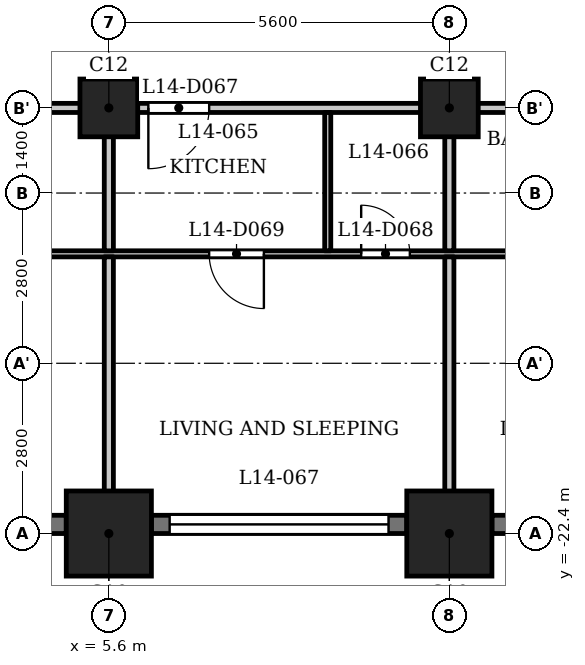
"""IFC4 building model, lengths in metres.
Left out: names, types, materials, properties, quantities, classifications, styles, units other than length and angle.
Written with IfcOpenShell. Run it as: python <this file> out.ifc"""

import sys

from ifc_helpers import new_model, si_unit, direction, frame, frame_2d, origin, origin_2d, place, context, subcontext, project, spatial, rectangle, extrude, element, fill, save


model = new_model("IFC4")
c1 = context("Model", 3, precision=1e-05, world=origin(), true_north=direction((0.0, 1.0)))
c2 = subcontext(c1, "Body", "Model", "MODEL_VIEW")
j1 = project(units=[si_unit("LENGTHUNIT", "METRE"), si_unit("PLANEANGLEUNIT", "RADIAN")], contexts=[c1])
p1 = place(None, origin())
s1 = spatial("IfcSite", under=j1, at=p1, CompositionType="ELEMENT")
p2 = place(p1, origin())
s2 = spatial("IfcBuilding", under=s1, at=p2, CompositionType="ELEMENT")
p3 = place(p2, frame((0.0, 0.0, 58.5)))
s3 = spatial("IfcBuildingStorey", under=s2, at=p3, CompositionType="ELEMENT", Elevation=58.5)
for number, where, z_axis, x_axis in (
    (1, (5.6, -22.4, 0.0), (0.0, 0.0, 1.0), (1.0, 0.0, 0.0)),
    (2, (11.2, -22.4, 0.0), (0.0, 0.0, 1.0), (1.0, 0.0, 0.0)),
):
    element("IfcColumn", number, at=place(p3, frame(where, z_axis=z_axis, x_axis=x_axis)), inside=s3, PredefinedType="COLUMN", context=c2, shape_type="SweptSolid", body=[
        extrude(rectangle(XDim=1.4, YDim=1.4, at=origin_2d()), origin(), (0.0, 0.0, 1.0), 3.5),
    ])
for number, where, z_axis, x_axis in (
    (3, (5.6, -15.4, 0.0), (0.0, 0.0, 1.0), (1.0, 0.0, 0.0)),
    (4, (11.2, -15.4, 0.0), (0.0, 0.0, 1.0), (1.0, 0.0, 0.0)),
):
    element("IfcColumn", number, at=place(p3, frame(where, z_axis=z_axis, x_axis=x_axis)), inside=s3, PredefinedType="COLUMN", context=c2, shape_type="SweptSolid", body=[
        extrude(rectangle(XDim=0.95, YDim=0.95, at=origin_2d()), origin(), (0.0, 0.0, 1.0), 3.5),
    ])
p4 = place(p3, frame((0.7, -22.25, 0.0), z_axis=(0.0, 0.0, 1.0), x_axis=(1.0, 0.0, 0.0)))
e5 = element("IfcWall", 5, at=p4, inside=s3, PredefinedType="SOLIDWALL", context=c2, shape_type="SweptSolid", body=[
    extrude(rectangle(XDim=4.2, YDim=0.3, at=frame_2d((2.1, 0.0))), origin(), (0.0, 0.0, 1.0), 2.35),
])
p5 = place(p4, frame((0.3, 0.0, 1.2)))
e6 = element("IfcOpeningElement", 6, at=p5, cuts=e5, PredefinedType="OPENING", context=c2, shape_type="SweptSolid", body=[
    extrude(rectangle(XDim=3.6, YDim=0.95, at=frame_2d((1.8, 0.475))), frame((0.0, 0.16, 0.0), z_axis=(0.0, -1.0, 0.0), x_axis=(1.0, 0.0, 0.0)), (0.0, 0.0, 1.0), 0.32),
])
p6 = place(p3, frame((6.3, -22.25, 0.0), z_axis=(0.0, 0.0, 1.0), x_axis=(1.0, 0.0, 0.0)))
e7 = element("IfcWall", 7, at=p6, inside=s3, PredefinedType="SOLIDWALL", context=c2, shape_type="SweptSolid", body=[
    extrude(rectangle(XDim=4.2, YDim=0.3, at=frame_2d((2.1, 0.0))), origin(), (0.0, 0.0, 1.0), 2.35),
])
p7 = place(p6, frame((0.3, 0.0, 1.2)))
e8 = element("IfcOpeningElement", 8, at=p7, cuts=e7, PredefinedType="OPENING", context=c2, shape_type="SweptSolid", body=[
    extrude(rectangle(XDim=3.6, YDim=0.95, at=frame_2d((1.8, 0.475))), frame((0.0, 0.16, 0.0), z_axis=(0.0, -1.0, 0.0), x_axis=(1.0, 0.0, 0.0)), (0.0, 0.0, 1.0), 0.32),
])
p8 = place(p3, frame((11.9, -22.25, 0.0), z_axis=(0.0, 0.0, 1.0), x_axis=(1.0, 0.0, 0.0)))
e9 = element("IfcWall", 9, at=p8, inside=s3, PredefinedType="SOLIDWALL", context=c2, shape_type="SweptSolid", body=[
    extrude(rectangle(XDim=4.2, YDim=0.3, at=frame_2d((2.1, 0.0))), origin(), (0.0, 0.0, 1.0), 2.35),
])
p9 = place(p8, frame((0.3, 0.0, 1.2)))
e10 = element("IfcOpeningElement", 10, at=p9, cuts=e9, PredefinedType="OPENING", context=c2, shape_type="SweptSolid", body=[
    extrude(rectangle(XDim=3.6, YDim=0.95, at=frame_2d((1.8, 0.475))), frame((0.0, 0.16, 0.0), z_axis=(0.0, -1.0, 0.0), x_axis=(1.0, 0.0, 0.0)), (0.0, 0.0, 1.0), 0.32),
])
p10 = place(p3, frame((-26.394, -17.8, 0.0), z_axis=(0.0, 0.0, 1.0), x_axis=(1.0, 0.0, 0.0)))
e11 = element("IfcWall", 11, at=p10, inside=s3, PredefinedType="PARTITIONING", context=c2, shape_type="SweptSolid", body=[
    extrude(rectangle(XDim=53.034, YDim=0.1, at=frame_2d((26.517, 0.0))), origin(), (0.0, 0.0, 1.0), 3.2),
])
p11 = place(p10, frame((0.794, 0.0, 0.0)))
e12 = element("IfcOpeningElement", 12, at=p11, cuts=e11, PredefinedType="OPENING", context=c2, shape_type="SweptSolid", body=[
    extrude(rectangle(XDim=0.8, YDim=2.1, at=frame_2d((0.4, 1.05))), frame((0.0, 0.06, 0.0), z_axis=(0.0, -1.0, 0.0), x_axis=(1.0, 0.0, 0.0)), (0.0, 0.0, 1.0), 0.12),
])
p12 = place(p10, frame((5.644, 0.0, 0.0)))
e13 = element("IfcOpeningElement", 13, at=p12, cuts=e11, PredefinedType="OPENING", context=c2, shape_type="SweptSolid", body=[
    extrude(rectangle(XDim=0.9, YDim=2.1, at=frame_2d((0.45, 1.05))), frame((0.0, 0.06, 0.0), z_axis=(0.0, -1.0, 0.0), x_axis=(1.0, 0.0, 0.0)), (0.0, 0.0, 1.0), 0.12),
])
p13 = place(p10, frame((19.344, 0.0, 0.0)))
e14 = element("IfcOpeningElement", 14, at=p13, cuts=e11, PredefinedType="OPENING", context=c2, shape_type="SweptSolid", body=[
    extrude(rectangle(XDim=0.8, YDim=2.1, at=frame_2d((0.4, 1.05))), frame((0.0, 0.06, 0.0), z_axis=(0.0, -1.0, 0.0), x_axis=(1.0, 0.0, 0.0)), (0.0, 0.0, 1.0), 0.12),
])
p14 = place(p10, frame((17.094, 0.0, 0.0)))
e15 = element("IfcOpeningElement", 15, at=p14, cuts=e11, PredefinedType="OPENING", context=c2, shape_type="SweptSolid", body=[
    extrude(rectangle(XDim=0.9, YDim=2.1, at=frame_2d((0.45, 1.05))), frame((0.0, 0.06, 0.0), z_axis=(0.0, -1.0, 0.0), x_axis=(1.0, 0.0, 0.0)), (0.0, 0.0, 1.0), 0.12),
])
p15 = place(p10, frame((10.494, 0.0, 0.0)))
e16 = element("IfcOpeningElement", 16, at=p15, cuts=e11, PredefinedType="OPENING", context=c2, shape_type="SweptSolid", body=[
    extrude(rectangle(XDim=0.9, YDim=2.1, at=frame_2d((0.45, 1.05))), frame((0.0, 0.06, 0.0), z_axis=(0.0, -1.0, 0.0), x_axis=(1.0, 0.0, 0.0)), (0.0, 0.0, 1.0), 0.12),
])
p16 = place(p10, frame((13.294, 0.0, 0.0)))
e17 = element("IfcOpeningElement", 17, at=p16, cuts=e11, PredefinedType="OPENING", context=c2, shape_type="SweptSolid", body=[
    extrude(rectangle(XDim=0.9, YDim=2.1, at=frame_2d((0.45, 1.05))), frame((0.0, 0.06, 0.0), z_axis=(0.0, -1.0, 0.0), x_axis=(1.0, 0.0, 0.0)), (0.0, 0.0, 1.0), 0.12),
])
p17 = place(p10, frame((27.044, 0.0, 0.0)))
e18 = element("IfcOpeningElement", 18, at=p17, cuts=e11, PredefinedType="OPENING", context=c2, shape_type="SweptSolid", body=[
    extrude(rectangle(XDim=0.8, YDim=2.1, at=frame_2d((0.4, 1.05))), frame((0.0, 0.06, 0.0), z_axis=(0.0, -1.0, 0.0), x_axis=(1.0, 0.0, 0.0)), (0.0, 0.0, 1.0), 0.12),
])
p18 = place(p10, frame((22.444, 0.0, 0.0)))
e19 = element("IfcOpeningElement", 19, at=p18, cuts=e11, PredefinedType="OPENING", context=c2, shape_type="SweptSolid", body=[
    extrude(rectangle(XDim=0.9, YDim=2.1, at=frame_2d((0.45, 1.05))), frame((0.0, 0.06, 0.0), z_axis=(0.0, -1.0, 0.0), x_axis=(1.0, 0.0, 0.0)), (0.0, 0.0, 1.0), 0.12),
])
p19 = place(p10, frame((36.144, 0.0, 0.0)))
e20 = element("IfcOpeningElement", 20, at=p19, cuts=e11, PredefinedType="OPENING", context=c2, shape_type="SweptSolid", body=[
    extrude(rectangle(XDim=0.8, YDim=2.1, at=frame_2d((0.4, 1.05))), frame((0.0, 0.06, 0.0), z_axis=(0.0, -1.0, 0.0), x_axis=(1.0, 0.0, 0.0)), (0.0, 0.0, 1.0), 0.12),
])
p20 = place(p10, frame((33.644, 0.0, 0.0)))
e21 = element("IfcOpeningElement", 21, at=p20, cuts=e11, PredefinedType="OPENING", context=c2, shape_type="SweptSolid", body=[
    extrude(rectangle(XDim=0.9, YDim=2.1, at=frame_2d((0.45, 1.05))), frame((0.0, 0.06, 0.0), z_axis=(0.0, -1.0, 0.0), x_axis=(1.0, 0.0, 0.0)), (0.0, 0.0, 1.0), 0.12),
])
p21 = place(p10, frame((39.144, 0.0, 0.0)))
e22 = element("IfcOpeningElement", 22, at=p21, cuts=e11, PredefinedType="OPENING", context=c2, shape_type="SweptSolid", body=[
    extrude(rectangle(XDim=0.8, YDim=2.1, at=frame_2d((0.4, 1.05))), frame((0.0, 0.06, 0.0), z_axis=(0.0, -1.0, 0.0), x_axis=(1.0, 0.0, 0.0)), (0.0, 0.0, 1.0), 0.12),
])
p22 = place(p10, frame((41.494, 0.0, 0.0)))
e23 = element("IfcOpeningElement", 23, at=p22, cuts=e11, PredefinedType="OPENING", context=c2, shape_type="SweptSolid", body=[
    extrude(rectangle(XDim=0.9, YDim=2.1, at=frame_2d((0.45, 1.05))), frame((0.0, 0.06, 0.0), z_axis=(0.0, -1.0, 0.0), x_axis=(1.0, 0.0, 0.0)), (0.0, 0.0, 1.0), 0.12),
])
p23 = place(p10, frame((49.362, 0.0, 0.0)))
e24 = element("IfcOpeningElement", 24, at=p23, cuts=e11, PredefinedType="OPENING", context=c2, shape_type="SweptSolid", body=[
    extrude(rectangle(XDim=0.8, YDim=2.1, at=frame_2d((0.4, 1.05))), frame((0.0, 0.06, 0.0), z_axis=(0.0, -1.0, 0.0), x_axis=(1.0, 0.0, 0.0)), (0.0, 0.0, 1.0), 0.12),
])
p24 = place(p10, frame((45.094, 0.0, 0.0)))
e25 = element("IfcOpeningElement", 25, at=p24, cuts=e11, PredefinedType="OPENING", context=c2, shape_type="SweptSolid", body=[
    extrude(rectangle(XDim=0.9, YDim=2.1, at=frame_2d((0.45, 1.05))), frame((0.0, 0.06, 0.0), z_axis=(0.0, -1.0, 0.0), x_axis=(1.0, 0.0, 0.0)), (0.0, 0.0, 1.0), 0.12),
])
p25 = place(p3, frame((-27.484, -15.4, 0.0), z_axis=(0.0, 0.0, 1.0), x_axis=(1.0, 0.0, 0.0)))
e26 = element("IfcWall", 26, at=p25, inside=s3, PredefinedType="PARTITIONING", context=c2, shape_type="SweptSolid", body=[
    extrude(rectangle(XDim=54.968, YDim=0.15, at=frame_2d((27.484, 0.0))), origin(), (0.0, 0.0, 1.0), 3.2),
])
p26 = place(p25, frame((5.734, 0.0, 0.0)))
e27 = element("IfcOpeningElement", 27, at=p26, cuts=e26, PredefinedType="OPENING", context=c2, shape_type="SweptSolid", body=[
    extrude(rectangle(XDim=1.0, YDim=2.1, at=frame_2d((0.5, 1.05))), frame((0.0, 0.085, 0.0), z_axis=(0.0, -1.0, 0.0), x_axis=(1.0, 0.0, 0.0)), (0.0, 0.0, 1.0), 0.17),
])
p27 = place(p25, frame((11.584, 0.0, 0.0)))
e28 = element("IfcOpeningElement", 28, at=p27, cuts=e26, PredefinedType="OPENING", context=c2, shape_type="SweptSolid", body=[
    extrude(rectangle(XDim=1.0, YDim=2.1, at=frame_2d((0.5, 1.05))), frame((0.0, 0.085, 0.0), z_axis=(0.0, -1.0, 0.0), x_axis=(1.0, 0.0, 0.0)), (0.0, 0.0, 1.0), 0.17),
])
p28 = place(p25, frame((22.534, 0.0, 0.0)))
e29 = element("IfcOpeningElement", 29, at=p28, cuts=e26, PredefinedType="OPENING", context=c2, shape_type="SweptSolid", body=[
    extrude(rectangle(XDim=1.0, YDim=2.1, at=frame_2d((0.5, 1.05))), frame((0.0, 0.085, 0.0), z_axis=(0.0, -1.0, 0.0), x_axis=(1.0, 0.0, 0.0)), (0.0, 0.0, 1.0), 0.17),
])
p29 = place(p25, frame((33.734, 0.0, 0.0)))
e30 = element("IfcOpeningElement", 30, at=p29, cuts=e26, PredefinedType="OPENING", context=c2, shape_type="SweptSolid", body=[
    extrude(rectangle(XDim=1.0, YDim=2.1, at=frame_2d((0.5, 1.05))), frame((0.0, 0.085, 0.0), z_axis=(0.0, -1.0, 0.0), x_axis=(1.0, 0.0, 0.0)), (0.0, 0.0, 1.0), 0.17),
])
p30 = place(p25, frame((42.334, 0.0, 0.0)))
e31 = element("IfcOpeningElement", 31, at=p30, cuts=e26, PredefinedType="OPENING", context=c2, shape_type="SweptSolid", body=[
    extrude(rectangle(XDim=1.0, YDim=2.1, at=frame_2d((0.5, 1.05))), frame((0.0, 0.085, 0.0), z_axis=(0.0, -1.0, 0.0), x_axis=(1.0, 0.0, 0.0)), (0.0, 0.0, 1.0), 0.17),
])
p31 = place(p25, frame((45.184, 0.0, 0.0)))
e32 = element("IfcOpeningElement", 32, at=p31, cuts=e26, PredefinedType="OPENING", context=c2, shape_type="SweptSolid", body=[
    extrude(rectangle(XDim=1.0, YDim=2.1, at=frame_2d((0.5, 1.05))), frame((0.0, 0.085, 0.0), z_axis=(0.0, -1.0, 0.0), x_axis=(1.0, 0.0, 0.0)), (0.0, 0.0, 1.0), 0.17),
])
p32 = place(p3, frame((5.6, -23.08, 0.0), z_axis=(0.0, 0.0, 1.0), x_axis=(0.0, 1.0, 0.0)))
e33 = element("IfcWall", 33, at=p32, inside=s3, PredefinedType="PARTITIONING", context=c2, shape_type="SweptSolid", body=[
    extrude(rectangle(XDim=5.23, YDim=0.15, at=frame_2d((2.615, 0.0))), origin(), (0.0, 0.0, 1.0), 3.2),
])
p33 = place(p3, frame((5.6, -17.75, 0.0), z_axis=(0.0, 0.0, 1.0), x_axis=(0.0, 1.0, 0.0)))
e34 = element("IfcWall", 34, at=p33, inside=s3, PredefinedType="PARTITIONING", context=c2, shape_type="SweptSolid", body=[
    extrude(rectangle(XDim=2.275, YDim=0.15, at=frame_2d((1.137, 0.0))), origin(), (0.0, 0.0, 1.0), 3.2),
])
p34 = place(p3, frame((9.2, -17.75, 0.0), z_axis=(0.0, 0.0, 1.0), x_axis=(0.0, 1.0, 0.0)))
e35 = element("IfcWall", 35, at=p34, inside=s3, PredefinedType="PARTITIONING", context=c2, shape_type="SweptSolid", body=[
    extrude(rectangle(XDim=2.275, YDim=0.1, at=frame_2d((1.137, 0.0))), origin(), (0.0, 0.0, 1.0), 3.2),
])
p35 = place(p3, frame((11.2, -23.08, 0.0), z_axis=(0.0, 0.0, 1.0), x_axis=(0.0, 1.0, 0.0)))
e36 = element("IfcWall", 36, at=p35, inside=s3, PredefinedType="PARTITIONING", context=c2, shape_type="SweptSolid", body=[
    extrude(rectangle(XDim=5.23, YDim=0.15, at=frame_2d((2.615, 0.0))), origin(), (0.0, 0.0, 1.0), 3.2),
])
p36 = place(p3, frame((11.2, -17.75, 0.0), z_axis=(0.0, 0.0, 1.0), x_axis=(0.0, 1.0, 0.0)))
e37 = element("IfcWall", 37, at=p36, inside=s3, PredefinedType="PARTITIONING", context=c2, shape_type="SweptSolid", body=[
    extrude(rectangle(XDim=2.275, YDim=0.15, at=frame_2d((1.137, 0.0))), origin(), (0.0, 0.0, 1.0), 3.2),
])
p37 = place(p29, origin())
e38 = element("IfcDoor", 38, at=p37, inside=s3, OperationType="SINGLE_SWING_LEFT", PredefinedType="DOOR", context=c2, shape_type="SweptSolid", body=[
    extrude(rectangle(XDim=1.0, YDim=2.1, at=frame_2d((0.5, 1.05))), frame((0.0, 0.025, 0.0), z_axis=(0.0, -1.0, 0.0), x_axis=(1.0, 0.0, 0.0)), (0.0, 0.0, 1.0), 0.05),
])
fill(e30, e38)
p38 = place(p19, origin())
e39 = element("IfcDoor", 39, at=p38, inside=s3, OperationType="SINGLE_SWING_RIGHT", PredefinedType="DOOR", context=c2, shape_type="SweptSolid", body=[
    extrude(rectangle(XDim=0.8, YDim=2.1, at=frame_2d((0.4, 1.05))), frame((0.0, 0.025, 0.0), z_axis=(0.0, -1.0, 0.0), x_axis=(1.0, 0.0, 0.0)), (0.0, 0.0, 1.0), 0.05),
])
fill(e20, e39)
p39 = place(p20, origin())
e40 = element("IfcDoor", 40, at=p39, inside=s3, OperationType="SINGLE_SWING_RIGHT", PredefinedType="DOOR", context=c2, shape_type="SweptSolid", body=[
    extrude(rectangle(XDim=0.9, YDim=2.1, at=frame_2d((0.45, 1.05))), frame((0.0, 0.025, 0.0), z_axis=(0.0, -1.0, 0.0), x_axis=(1.0, 0.0, 0.0)), (0.0, 0.0, 1.0), 0.05),
])
fill(e21, e40)
p40 = place(p7, origin())
e41 = element("IfcWindow", 41, at=p40, inside=s3, PartitioningType="SINGLE_PANEL", PredefinedType="WINDOW", context=c2, shape_type="SweptSolid", body=[
    extrude(rectangle(XDim=3.6, YDim=0.95, at=frame_2d((1.8, 0.475))), frame((0.0, 0.03, 0.0), z_axis=(0.0, -1.0, 0.0), x_axis=(1.0, 0.0, 0.0)), (0.0, 0.0, 1.0), 0.06),
])
fill(e8, e41)
save(model, sys.argv[1])
